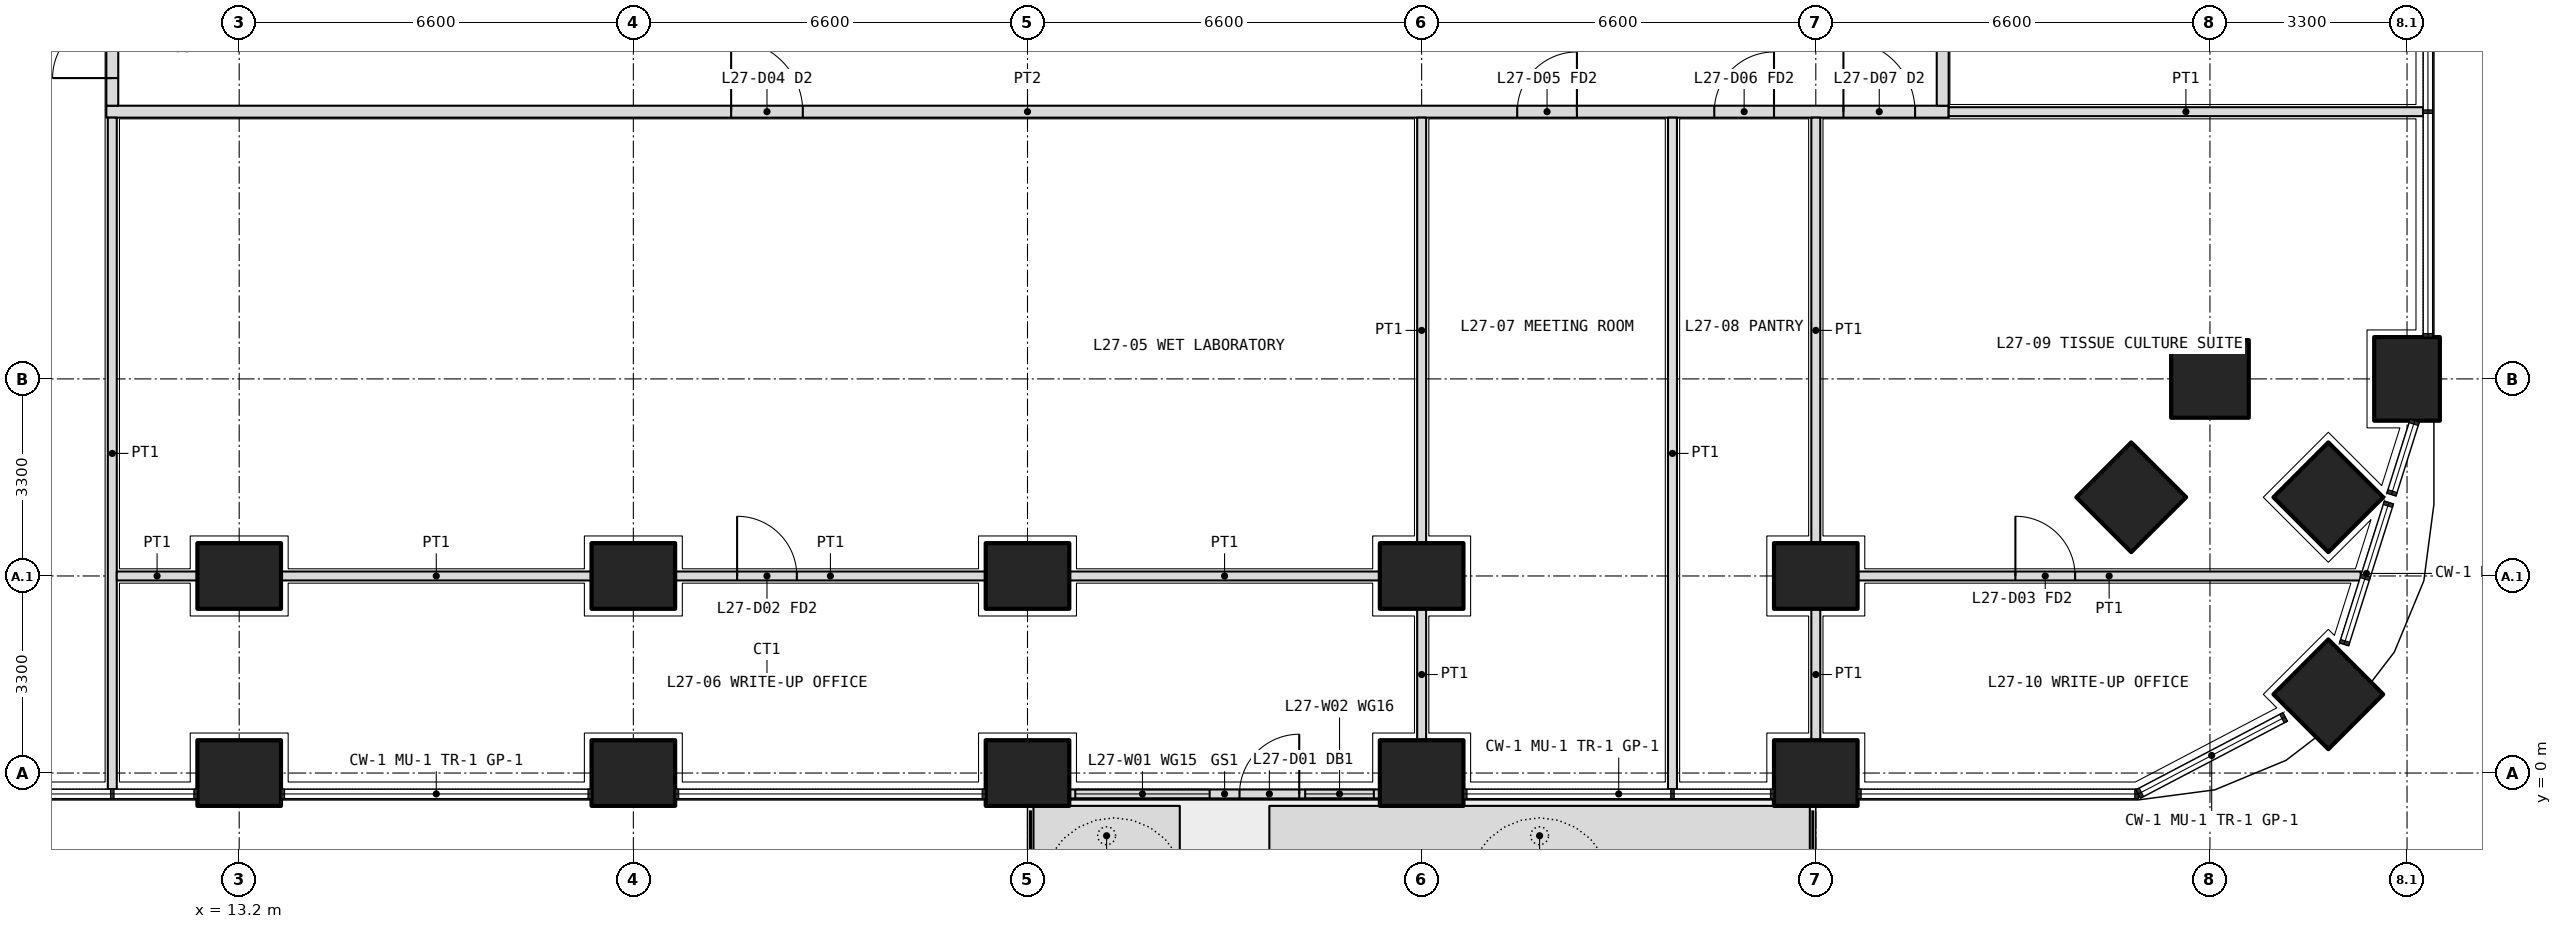
"""IFC4 building model, lengths in metres.
Left out: names, types, materials, properties, quantities, classifications, styles, units other than length and angle.
Written with IfcOpenShell. Run it as: python <this file> out.ifc"""

import sys

from ifc_helpers import new_model, si_unit, direction, frame, frame_2d, origin, origin_2d, place, context, subcontext, project, spatial, polyline, rectangle, outline, extrude, element, fill, save


model = new_model("IFC4")
c1 = context("Model", 3, precision=1e-05, world=origin(), true_north=direction((0.0, 1.0)))
c2 = subcontext(c1, "Body", "Model", "MODEL_VIEW")
j1 = project(units=[si_unit("LENGTHUNIT", "METRE"), si_unit("PLANEANGLEUNIT", "RADIAN")], contexts=[c1])
p1 = place(None, origin())
s1 = spatial("IfcSite", under=j1, at=p1, CompositionType="ELEMENT")
p2 = place(p1, origin())
s2 = spatial("IfcBuilding", under=s1, at=p2, CompositionType="ELEMENT")
p3 = place(p2, frame((0.0, 0.0, 120.0)))
s3 = spatial("IfcBuildingStorey", under=s2, at=p3, CompositionType="ELEMENT", Elevation=120.0)
p4 = place(p3, frame((48.182, 1.318, 0.0), z_axis=(0.0, 0.0, 1.0), x_axis=(0.707106781187, 0.707106781187, 0.0)))
e1 = element("IfcColumn", 1, at=p4, inside=s3, PredefinedType="COLUMN", context=c2, shape_type="SweptSolid", body=[
    extrude(rectangle(XDim=1.3, YDim=1.3, at=origin_2d()), origin(), (0.0, 0.0, 1.0), 4.2),
])
for number, where, z_axis, x_axis in (
    (2, (13.2, 0.0, 0.0), (0.0, 0.0, 1.0), (1.0, 0.0, 0.0)),
    (3, (19.8, 0.0, 0.0), (0.0, 0.0, 1.0), (1.0, 0.0, 0.0)),
    (4, (26.4, 0.0, 0.0), (0.0, 0.0, 1.0), (1.0, 0.0, 0.0)),
    (5, (33.0, 0.0, 0.0), (0.0, 0.0, 1.0), (1.0, 0.0, 0.0)),
    (6, (39.6, 0.0, 0.0), (0.0, 0.0, 1.0), (1.0, 0.0, 0.0)),
    (7, (49.5, 6.6, 0.0), (0.0, 0.0, 1.0), (0.0, 1.0, 0.0)),
):
    element("IfcColumn", number, at=place(p3, frame(where, z_axis=z_axis, x_axis=x_axis)), inside=s3, PredefinedType="COLUMN", context=c2, shape_type="SweptSolid", body=[
        extrude(rectangle(XDim=1.4, YDim=1.1, at=origin_2d()), origin(), (0.0, 0.0, 1.0), 4.2),
    ])
for number, where, z_axis, x_axis in (
    (8, (46.2, 6.6, 0.0), (0.0, 0.0, 1.0), (1.0, 0.0, 0.0)),
    (9, (48.182, 4.618, 0.0), (0.0, 0.0, 1.0), (0.707, 0.707, 0.0)),
):
    element("IfcColumn", number, at=place(p3, frame(where, z_axis=z_axis, x_axis=x_axis)), inside=s3, PredefinedType="COLUMN", context=c2, shape_type="SweptSolid", body=[
        extrude(rectangle(XDim=1.3, YDim=1.3, at=origin_2d()), origin(), (0.0, 0.0, 1.0), 4.2),
    ])
for number, where, z_axis, x_axis in (
    (10, (13.2, 3.3, 0.0), (0.0, 0.0, 1.0), (1.0, 0.0, 0.0)),
    (11, (19.8, 3.3, 0.0), (0.0, 0.0, 1.0), (1.0, 0.0, 0.0)),
    (12, (26.4, 3.3, 0.0), (0.0, 0.0, 1.0), (1.0, 0.0, 0.0)),
    (13, (33.0, 3.3, 0.0), (0.0, 0.0, 1.0), (1.0, 0.0, 0.0)),
    (14, (39.6, 3.3, 0.0), (0.0, 0.0, 1.0), (1.0, 0.0, 0.0)),
):
    element("IfcColumn", number, at=place(p3, frame(where, z_axis=z_axis, x_axis=x_axis)), inside=s3, PredefinedType="COLUMN", context=c2, shape_type="SweptSolid", body=[
        extrude(rectangle(XDim=1.4, YDim=1.1, at=origin_2d()), origin(), (0.0, 0.0, 1.0), 4.2),
    ])
p5 = place(p3, frame((44.882, 4.618, 0.0), z_axis=(0.0, 0.0, 1.0), x_axis=(0.707106781187, 0.707106781187, 0.0)))
e15 = element("IfcColumn", 15, at=p5, inside=s3, PredefinedType="COLUMN", context=c2, shape_type="SweptSolid", body=[
    extrude(rectangle(XDim=1.3, YDim=1.3, at=origin_2d()), origin(), (0.0, 0.0, 1.0), 4.2),
])
p6 = place(p3, origin())
e16 = element("IfcWall", 16, at=p6, inside=s3, PredefinedType="USERDEFINED", context=c2, shape_type="SweptSolid", body=[
    extrude(outline(polyline([(26.5, -1.55), (28.95, -1.55), (28.95, -0.55), (26.5, -0.55), (26.5, -1.55)]), holes=[polyline([(26.65, -1.4), (28.8, -1.4), (28.8, -0.7), (26.65, -0.7), (26.65, -1.4)])]), origin(), (0.0, 0.0, 1.0), 1.05),
])
p7 = place(p3, origin())
e17 = element("IfcWall", 17, at=p7, inside=s3, PredefinedType="USERDEFINED", context=c2, shape_type="SweptSolid", body=[
    extrude(outline(polyline([(30.45, -1.55), (39.5, -1.55), (39.5, -0.55), (30.45, -0.55), (30.45, -1.55)]), holes=[polyline([(30.6, -1.4), (39.35, -1.4), (39.35, -0.7), (30.6, -0.7), (30.6, -1.4)])]), origin(), (0.0, 0.0, 1.0), 1.05),
])
p8 = place(p3, frame((27.1, -0.35, 0.0), z_axis=(0.0, 0.0, 1.0), x_axis=(1.0, 0.0, 0.0)))
e18 = element("IfcWall", 18, at=p8, inside=s3, PredefinedType="SOLIDWALL", context=c2, shape_type="SweptSolid", body=[
    extrude(rectangle(XDim=5.2, YDim=0.15, at=frame_2d((2.6, 0.0))), origin(), (0.0, 0.0, 1.0), 2.7),
])
p9 = place(p8, frame((2.85, 0.0, 0.0)))
e19 = element("IfcOpeningElement", 19, at=p9, cuts=e18, PredefinedType="OPENING", context=c2, shape_type="SweptSolid", body=[
    extrude(rectangle(XDim=1.0, YDim=2.4, at=frame_2d((0.5, 1.2))), frame((0.0, 0.085, 0.0), z_axis=(0.0, -1.0, 0.0), x_axis=(1.0, 0.0, 0.0)), (0.0, 0.0, 1.0), 0.17),
])
p10 = place(p8, frame((0.1, 0.0, 0.1)))
e20 = element("IfcOpeningElement", 20, at=p10, cuts=e18, PredefinedType="OPENING", context=c2, shape_type="SweptSolid", body=[
    extrude(rectangle(XDim=2.25, YDim=2.3, at=frame_2d((1.125, 1.15))), frame((0.0, 0.085, 0.0), z_axis=(0.0, -1.0, 0.0), x_axis=(1.0, 0.0, 0.0)), (0.0, 0.0, 1.0), 0.17),
])
p11 = place(p8, frame((3.95, 0.0, 0.1)))
e21 = element("IfcOpeningElement", 21, at=p11, cuts=e18, PredefinedType="OPENING", context=c2, shape_type="SweptSolid", body=[
    extrude(rectangle(XDim=1.15, YDim=2.3, at=frame_2d((0.575, 1.15))), frame((0.0, 0.085, 0.0), z_axis=(0.0, -1.0, 0.0), x_axis=(1.0, 0.0, 0.0)), (0.0, 0.0, 1.0), 0.17),
])
p12 = place(p3, frame((10.975, 11.075, 0.0), z_axis=(0.0, 0.0, 1.0), x_axis=(1.0, 0.0, 0.0)))
e22 = element("IfcWall", 22, at=p12, inside=s3, PredefinedType="PARTITIONING", context=c2, shape_type="SweptSolid", body=[
    extrude(rectangle(XDim=30.85, YDim=0.2, at=frame_2d((15.425, 0.0))), origin(), (0.0, 0.0, 1.0), 2.85),
])
p13 = place(p12, frame((10.462, 0.0, 0.0)))
e23 = element("IfcOpeningElement", 23, at=p13, cuts=e22, PredefinedType="OPENING", context=c2, shape_type="SweptSolid", body=[
    extrude(rectangle(XDim=1.2, YDim=2.1, at=frame_2d((0.6, 1.05))), frame((0.0, 0.11, 0.0), z_axis=(0.0, -1.0, 0.0), x_axis=(1.0, 0.0, 0.0)), (0.0, 0.0, 1.0), 0.22),
])
p14 = place(p12, frame((23.625, 0.0, 0.0)))
e24 = element("IfcOpeningElement", 24, at=p14, cuts=e22, PredefinedType="OPENING", context=c2, shape_type="SweptSolid", body=[
    extrude(rectangle(XDim=1.0, YDim=2.1, at=frame_2d((0.5, 1.05))), frame((0.0, 0.11, 0.0), z_axis=(0.0, -1.0, 0.0), x_axis=(1.0, 0.0, 0.0)), (0.0, 0.0, 1.0), 0.22),
])
p15 = place(p12, frame((26.925, 0.0, 0.0)))
e25 = element("IfcOpeningElement", 25, at=p15, cuts=e22, PredefinedType="OPENING", context=c2, shape_type="SweptSolid", body=[
    extrude(rectangle(XDim=1.0, YDim=2.1, at=frame_2d((0.5, 1.05))), frame((0.0, 0.11, 0.0), z_axis=(0.0, -1.0, 0.0), x_axis=(1.0, 0.0, 0.0)), (0.0, 0.0, 1.0), 0.22),
])
p16 = place(p12, frame((29.087, 0.0, 0.0)))
e26 = element("IfcOpeningElement", 26, at=p16, cuts=e22, PredefinedType="OPENING", context=c2, shape_type="SweptSolid", body=[
    extrude(rectangle(XDim=1.2, YDim=2.1, at=frame_2d((0.6, 1.05))), frame((0.0, 0.11, 0.0), z_axis=(0.0, -1.0, 0.0), x_axis=(1.0, 0.0, 0.0)), (0.0, 0.0, 1.0), 0.22),
])
p17 = place(p3, frame((11.075, 11.175, 0.0), z_axis=(0.0, 0.0, 1.0), x_axis=(0.0, 1.0, 0.0)))
e27 = element("IfcWall", 27, at=p17, inside=s3, PredefinedType="PARTITIONING", context=c2, shape_type="SweptSolid", body=[
    extrude(rectangle(XDim=27.625, YDim=0.2, at=frame_2d((13.812, 0.0))), origin(), (0.0, 0.0, 1.0), 2.85),
])
p18 = place(p17, frame((0.462, 0.0, 0.0)))
e28 = element("IfcOpeningElement", 28, at=p18, cuts=e27, PredefinedType="OPENING", context=c2, shape_type="SweptSolid", body=[
    extrude(rectangle(XDim=1.0, YDim=2.1, at=frame_2d((0.5, 1.05))), frame((0.0, 0.11, 0.0), z_axis=(0.0, -1.0, 0.0), x_axis=(1.0, 0.0, 0.0)), (0.0, 0.0, 1.0), 0.22),
])
p19 = place(p17, frame((2.575, 0.0, 0.0)))
e29 = element("IfcOpeningElement", 29, at=p19, cuts=e27, PredefinedType="OPENING", context=c2, shape_type="SweptSolid", body=[
    extrude(rectangle(XDim=1.0, YDim=2.1, at=frame_2d((0.5, 1.05))), frame((0.0, 0.11, 0.0), z_axis=(0.0, -1.0, 0.0), x_axis=(1.0, 0.0, 0.0)), (0.0, 0.0, 1.0), 0.22),
])
p20 = place(p17, frame((5.65, 0.0, 0.0)))
e30 = element("IfcOpeningElement", 30, at=p20, cuts=e27, PredefinedType="OPENING", context=c2, shape_type="SweptSolid", body=[
    extrude(rectangle(XDim=0.9, YDim=2.1, at=frame_2d((0.45, 1.05))), frame((0.0, 0.11, 0.0), z_axis=(0.0, -1.0, 0.0), x_axis=(1.0, 0.0, 0.0)), (0.0, 0.0, 1.0), 0.22),
])
p21 = place(p17, frame((9.5, 0.0, 0.0)))
e31 = element("IfcOpeningElement", 31, at=p21, cuts=e27, PredefinedType="OPENING", context=c2, shape_type="SweptSolid", body=[
    extrude(rectangle(XDim=0.9, YDim=2.1, at=frame_2d((0.45, 1.05))), frame((0.0, 0.11, 0.0), z_axis=(0.0, -1.0, 0.0), x_axis=(1.0, 0.0, 0.0)), (0.0, 0.0, 1.0), 0.22),
])
p22 = place(p17, frame((13.025, 0.0, 0.0)))
e32 = element("IfcOpeningElement", 32, at=p22, cuts=e27, PredefinedType="OPENING", context=c2, shape_type="SweptSolid", body=[
    extrude(rectangle(XDim=1.0, YDim=2.1, at=frame_2d((0.5, 1.05))), frame((0.0, 0.11, 0.0), z_axis=(0.0, -1.0, 0.0), x_axis=(1.0, 0.0, 0.0)), (0.0, 0.0, 1.0), 0.22),
])
p23 = place(p17, frame((20.975, 0.0, 0.0)))
e33 = element("IfcOpeningElement", 33, at=p23, cuts=e27, PredefinedType="OPENING", context=c2, shape_type="SweptSolid", body=[
    extrude(rectangle(XDim=1.0, YDim=2.1, at=frame_2d((0.5, 1.05))), frame((0.0, 0.11, 0.0), z_axis=(0.0, -1.0, 0.0), x_axis=(1.0, 0.0, 0.0)), (0.0, 0.0, 1.0), 0.22),
])
p24 = place(p3, frame((41.725, 11.175, 0.0), z_axis=(0.0, 0.0, 1.0), x_axis=(0.0, 1.0, 0.0)))
e34 = element("IfcWall", 34, at=p24, inside=s3, PredefinedType="PARTITIONING", context=c2, shape_type="SweptSolid", body=[
    extrude(rectangle(XDim=5.325, YDim=0.2, at=frame_2d((2.663, 0.0))), origin(), (0.0, 0.0, 1.0), 2.85),
])
p25 = place(p24, frame((2.113, 0.0, 0.0)))
e35 = element("IfcOpeningElement", 35, at=p25, cuts=e34, PredefinedType="OPENING", context=c2, shape_type="SweptSolid", body=[
    extrude(rectangle(XDim=1.0, YDim=2.1, at=frame_2d((0.5, 1.05))), frame((0.0, 0.11, 0.0), z_axis=(0.0, -1.0, 0.0), x_axis=(1.0, 0.0, 0.0)), (0.0, 0.0, 1.0), 0.22),
])
p26 = place(p3, frame((11.075, -0.27, 0.0), z_axis=(0.0, 0.0, 1.0), x_axis=(0.0, 1.0, 0.0)))
e36 = element("IfcWall", 36, at=p26, inside=s3, PredefinedType="PARTITIONING", context=c2, shape_type="SweptSolid", body=[
    extrude(rectangle(XDim=11.245, YDim=0.15, at=frame_2d((5.623, 0.0))), origin(), (0.0, 0.0, 1.0), 2.7),
])
p27 = place(p3, frame((49.77, 11.075, 0.0), z_axis=(0.0, 0.0, 1.0), x_axis=(-1.0, 0.0, 0.0)))
e37 = element("IfcWall", 37, at=p27, inside=s3, PredefinedType="PARTITIONING", context=c2, shape_type="SweptSolid", body=[
    extrude(rectangle(XDim=7.945, YDim=0.15, at=frame_2d((3.973, 0.0))), origin(), (0.0, 0.0, 1.0), 2.7),
])
p28 = place(p3, frame((11.15, 3.3, 0.0), z_axis=(0.0, 0.0, 1.0), x_axis=(1.0, 0.0, 0.0)))
e38 = element("IfcWall", 38, at=p28, inside=s3, PredefinedType="PARTITIONING", context=c2, shape_type="SweptSolid", body=[
    extrude(rectangle(XDim=1.35, YDim=0.15, at=frame_2d((0.675, 0.0))), origin(), (0.0, 0.0, 1.0), 3.9),
])
p29 = place(p3, frame((13.9, 3.3, 0.0), z_axis=(0.0, 0.0, 1.0), x_axis=(1.0, 0.0, 0.0)))
e39 = element("IfcWall", 39, at=p29, inside=s3, PredefinedType="PARTITIONING", context=c2, shape_type="SweptSolid", body=[
    extrude(rectangle(XDim=5.2, YDim=0.15, at=frame_2d((2.6, 0.0))), origin(), (0.0, 0.0, 1.0), 3.9),
])
p30 = place(p3, frame((20.5, 3.3, 0.0), z_axis=(0.0, 0.0, 1.0), x_axis=(1.0, 0.0, 0.0)))
e40 = element("IfcWall", 40, at=p30, inside=s3, PredefinedType="PARTITIONING", context=c2, shape_type="SweptSolid", body=[
    extrude(rectangle(XDim=5.2, YDim=0.15, at=frame_2d((2.6, 0.0))), origin(), (0.0, 0.0, 1.0), 3.9),
])
p31 = place(p30, frame((1.038, 0.0, 0.0)))
e41 = element("IfcOpeningElement", 41, at=p31, cuts=e40, PredefinedType="OPENING", context=c2, shape_type="SweptSolid", body=[
    extrude(rectangle(XDim=1.0, YDim=2.1, at=frame_2d((0.5, 1.05))), frame((0.0, 0.085, 0.0), z_axis=(0.0, -1.0, 0.0), x_axis=(1.0, 0.0, 0.0)), (0.0, 0.0, 1.0), 0.17),
])
p32 = place(p3, frame((27.1, 3.3, 0.0), z_axis=(0.0, 0.0, 1.0), x_axis=(1.0, 0.0, 0.0)))
e42 = element("IfcWall", 42, at=p32, inside=s3, PredefinedType="PARTITIONING", context=c2, shape_type="SweptSolid", body=[
    extrude(rectangle(XDim=5.2, YDim=0.15, at=frame_2d((2.6, 0.0))), origin(), (0.0, 0.0, 1.0), 3.9),
])
p33 = place(p3, frame((40.3, 3.3, 0.0), z_axis=(0.0, 0.0, 1.0), x_axis=(1.0, 0.0, 0.0)))
e43 = element("IfcWall", 43, at=p33, inside=s3, PredefinedType="PARTITIONING", context=c2, shape_type="SweptSolid", body=[
    extrude(rectangle(XDim=8.424, YDim=0.15, at=frame_2d((4.212, 0.0))), origin(), (0.0, 0.0, 1.0), 2.7),
])
p34 = place(p33, frame((2.642, 0.0, 0.0)))
e44 = element("IfcOpeningElement", 44, at=p34, cuts=e43, PredefinedType="OPENING", context=c2, shape_type="SweptSolid", body=[
    extrude(rectangle(XDim=1.0, YDim=2.1, at=frame_2d((0.5, 1.05))), frame((0.0, 0.085, 0.0), z_axis=(0.0, -1.0, 0.0), x_axis=(1.0, 0.0, 0.0)), (0.0, 0.0, 1.0), 0.17),
])
p35 = place(p3, frame((37.2, -0.27, 0.0), z_axis=(0.0, 0.0, 1.0), x_axis=(0.0, 1.0, 0.0)))
e45 = element("IfcWall", 45, at=p35, inside=s3, PredefinedType="PARTITIONING", context=c2, shape_type="SweptSolid", body=[
    extrude(rectangle(XDim=11.245, YDim=0.15, at=frame_2d((5.623, 0.0))), origin(), (0.0, 0.0, 1.0), 2.7),
])
p36 = place(p3, frame((39.6, 0.55, 0.0), z_axis=(0.0, 0.0, 1.0), x_axis=(0.0, 1.0, 0.0)))
e46 = element("IfcWall", 46, at=p36, inside=s3, PredefinedType="PARTITIONING", context=c2, shape_type="SweptSolid", body=[
    extrude(rectangle(XDim=2.2, YDim=0.15, at=frame_2d((1.1, 0.0))), origin(), (0.0, 0.0, 1.0), 2.85),
])
p37 = place(p3, frame((39.6, 3.85, 0.0), z_axis=(0.0, 0.0, 1.0), x_axis=(0.0, 1.0, 0.0)))
e47 = element("IfcWall", 47, at=p37, inside=s3, PredefinedType="PARTITIONING", context=c2, shape_type="SweptSolid", body=[
    extrude(rectangle(XDim=7.125, YDim=0.15, at=frame_2d((3.562, 0.0))), origin(), (0.0, 0.0, 1.0), 2.85),
])
p38 = place(p3, frame((33.0, 0.55, 0.0), z_axis=(0.0, 0.0, 1.0), x_axis=(0.0, 1.0, 0.0)))
e48 = element("IfcWall", 48, at=p38, inside=s3, PredefinedType="PARTITIONING", context=c2, shape_type="SweptSolid", body=[
    extrude(rectangle(XDim=2.2, YDim=0.15, at=frame_2d((1.1, 0.0))), origin(), (0.0, 0.0, 1.0), 2.85),
])
p39 = place(p3, frame((33.0, 3.85, 0.0), z_axis=(0.0, 0.0, 1.0), x_axis=(0.0, 1.0, 0.0)))
e49 = element("IfcWall", 49, at=p39, inside=s3, PredefinedType="PARTITIONING", context=c2, shape_type="SweptSolid", body=[
    extrude(rectangle(XDim=7.125, YDim=0.15, at=frame_2d((3.562, 0.0))), origin(), (0.0, 0.0, 1.0), 2.85),
])
p40 = place(p9, origin())
e50 = element("IfcDoor", 50, at=p40, inside=s3, OperationType="SINGLE_SWING_RIGHT", PredefinedType="DOOR", context=c2, shape_type="SweptSolid", body=[
    extrude(rectangle(XDim=1.0, YDim=2.4, at=frame_2d((0.5, 1.2))), frame((0.0, 0.025, 0.0), z_axis=(0.0, -1.0, 0.0), x_axis=(1.0, 0.0, 0.0)), (0.0, 0.0, 1.0), 0.05),
])
fill(e19, e50)
p41 = place(p10, origin())
e51 = element("IfcWindow", 51, at=p41, inside=s3, PartitioningType="SINGLE_PANEL", PredefinedType="WINDOW", context=c2, shape_type="SweptSolid", body=[
    extrude(rectangle(XDim=2.25, YDim=2.3, at=frame_2d((1.125, 1.15))), frame((0.0, 0.03, 0.0), z_axis=(0.0, -1.0, 0.0), x_axis=(1.0, 0.0, 0.0)), (0.0, 0.0, 1.0), 0.06),
])
fill(e20, e51)
p42 = place(p11, origin())
e52 = element("IfcWindow", 52, at=p42, inside=s3, PartitioningType="SINGLE_PANEL", PredefinedType="WINDOW", context=c2, shape_type="SweptSolid", body=[
    extrude(rectangle(XDim=1.15, YDim=2.3, at=frame_2d((0.575, 1.15))), frame((0.0, 0.03, 0.0), z_axis=(0.0, -1.0, 0.0), x_axis=(1.0, 0.0, 0.0)), (0.0, 0.0, 1.0), 0.06),
])
fill(e21, e52)
p43 = place(p13, origin())
e53 = element("IfcDoor", 53, at=p43, inside=s3, OperationType="DOUBLE_DOOR_SINGLE_SWING", PredefinedType="DOOR", context=c2, shape_type="SweptSolid", body=[
    extrude(rectangle(XDim=1.2, YDim=2.1, at=frame_2d((0.6, 1.05))), frame((0.0, 0.025, 0.0), z_axis=(0.0, -1.0, 0.0), x_axis=(1.0, 0.0, 0.0)), (0.0, 0.0, 1.0), 0.05),
])
fill(e23, e53)
p44 = place(p31, origin())
e54 = element("IfcDoor", 54, at=p44, inside=s3, OperationType="SINGLE_SWING_LEFT", PredefinedType="DOOR", context=c2, shape_type="SweptSolid", body=[
    extrude(rectangle(XDim=1.0, YDim=2.1, at=frame_2d((0.5, 1.05))), frame((0.0, 0.025, 0.0), z_axis=(0.0, -1.0, 0.0), x_axis=(1.0, 0.0, 0.0)), (0.0, 0.0, 1.0), 0.05),
])
fill(e41, e54)
p45 = place(p14, origin())
e55 = element("IfcDoor", 55, at=p45, inside=s3, OperationType="SINGLE_SWING_RIGHT", PredefinedType="DOOR", context=c2, shape_type="SweptSolid", body=[
    extrude(rectangle(XDim=1.0, YDim=2.1, at=frame_2d((0.5, 1.05))), frame((0.0, 0.025, 0.0), z_axis=(0.0, -1.0, 0.0), x_axis=(1.0, 0.0, 0.0)), (0.0, 0.0, 1.0), 0.05),
])
fill(e24, e55)
p46 = place(p15, origin())
e56 = element("IfcDoor", 56, at=p46, inside=s3, OperationType="SINGLE_SWING_RIGHT", PredefinedType="DOOR", context=c2, shape_type="SweptSolid", body=[
    extrude(rectangle(XDim=1.0, YDim=2.1, at=frame_2d((0.5, 1.05))), frame((0.0, 0.025, 0.0), z_axis=(0.0, -1.0, 0.0), x_axis=(1.0, 0.0, 0.0)), (0.0, 0.0, 1.0), 0.05),
])
fill(e25, e56)
p47 = place(p16, origin())
e57 = element("IfcDoor", 57, at=p47, inside=s3, OperationType="DOUBLE_DOOR_SINGLE_SWING", PredefinedType="DOOR", context=c2, shape_type="SweptSolid", body=[
    extrude(rectangle(XDim=1.2, YDim=2.1, at=frame_2d((0.6, 1.05))), frame((0.0, 0.025, 0.0), z_axis=(0.0, -1.0, 0.0), x_axis=(1.0, 0.0, 0.0)), (0.0, 0.0, 1.0), 0.05),
])
fill(e26, e57)
p48 = place(p34, origin())
e58 = element("IfcDoor", 58, at=p48, inside=s3, OperationType="SINGLE_SWING_LEFT", PredefinedType="DOOR", context=c2, shape_type="SweptSolid", body=[
    extrude(rectangle(XDim=1.0, YDim=2.1, at=frame_2d((0.5, 1.05))), frame((0.0, 0.025, 0.0), z_axis=(0.0, -1.0, 0.0), x_axis=(1.0, 0.0, 0.0)), (0.0, 0.0, 1.0), 0.05),
])
fill(e44, e58)
p49 = place(p18, origin())
e59 = element("IfcDoor", 59, at=p49, inside=s3, OperationType="SINGLE_SWING_LEFT", PredefinedType="DOOR", context=c2, shape_type="SweptSolid", body=[
    extrude(rectangle(XDim=1.0, YDim=2.1, at=frame_2d((0.5, 1.05))), frame((0.0, 0.025, 0.0), z_axis=(0.0, -1.0, 0.0), x_axis=(1.0, 0.0, 0.0)), (0.0, 0.0, 1.0), 0.05),
])
fill(e28, e59)
save(model, sys.argv[1])
